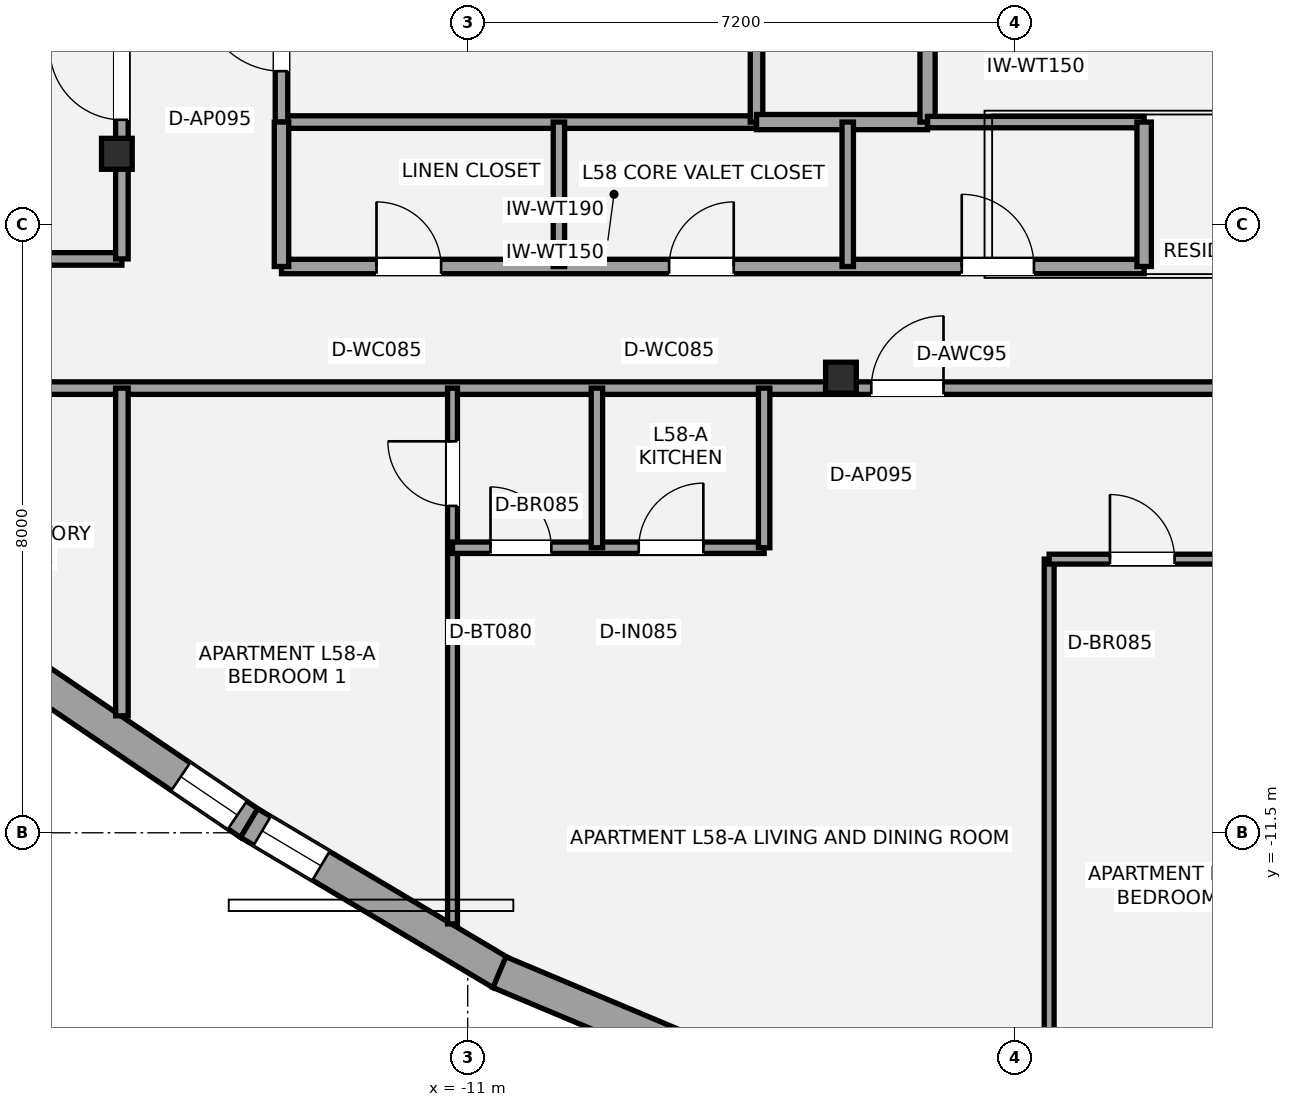
"""IFC4 building model, lengths in metres.
Left out: names, types, materials, properties, quantities, classifications, styles, units other than length and angle.
Written with IfcOpenShell. Run it as: python <this file> out.ifc"""

import sys

from ifc_helpers import new_model, si_unit, direction, frame, frame_2d, origin, origin_2d, place, context, subcontext, project, spatial, rectangle, i_section, extrude, element, fill, save


model = new_model("IFC4")
c1 = context("Model", 3, precision=1e-05, world=origin(), true_north=direction((0.0, 1.0)))
c2 = subcontext(c1, "Body", "Model", "MODEL_VIEW")
j1 = project(units=[si_unit("LENGTHUNIT", "METRE"), si_unit("PLANEANGLEUNIT", "RADIAN")], contexts=[c1])
p1 = place(None, origin())
s1 = spatial("IfcSite", under=j1, at=p1, CompositionType="ELEMENT")
p2 = place(p1, origin())
s2 = spatial("IfcBuilding", under=s1, at=p2, CompositionType="ELEMENT")
p3 = place(p2, frame((0.0, 0.0, 210.0)))
s3 = spatial("IfcBuildingStorey", under=s2, at=p3, CompositionType="ELEMENT", Elevation=210.0)
for number, where, z_axis, x_axis in (
    (1, (-15.616, -2.567, 0.0), (0.0, 0.0, 1.0), (1.0, 0.0, 0.0)),
    (2, (-6.09, -5.513, 0.0), (0.0, 0.0, 1.0), (1.0, 0.0, 0.0)),
):
    element("IfcColumn", number, at=place(p3, frame(where, z_axis=z_axis, x_axis=x_axis)), inside=s3, PredefinedType="COLUMN", context=c2, shape_type="SweptSolid", body=[
        extrude(i_section(OverallWidth=0.404, OverallDepth=0.407, WebThickness=0.027, FlangeThickness=0.044, at=origin_2d()), origin(), (0.0, 0.0, 1.0), 3.15),
    ])
p4 = place(p3, frame((-13.865, -11.379, 0.0), z_axis=(0.0, 0.0, 1.0), x_axis=(-0.827589832786, 0.561333295529, 0.0)))
e3 = element("IfcWall", 3, at=p4, inside=s3, PredefinedType="STANDARD", context=c2, shape_type="SweptSolid", body=[
    extrude(rectangle(XDim=3.693, YDim=0.44, at=frame_2d((1.847, 0.0))), origin(), (0.0, 0.0, 1.0), 2.336),
])
p5 = place(p4, frame((0.2, 0.0, 0.42)))
e4 = element("IfcOpeningElement", 4, at=p5, cuts=e3, PredefinedType="OPENING", context=c2, shape_type="SweptSolid", body=[
    extrude(rectangle(XDim=0.9, YDim=1.35, at=frame_2d((0.45, 0.675))), frame((0.0, 0.23, 0.0), z_axis=(0.0, -1.0, 0.0), x_axis=(1.0, 0.0, 0.0)), (0.0, 0.0, 1.0), 0.46),
])
p6 = place(p3, frame((-10.555, -13.348, 0.0), z_axis=(0.0, 0.0, 1.0), x_axis=(-0.859415840392, 0.511277237204, 0.0)))
e5 = element("IfcWall", 5, at=p6, inside=s3, PredefinedType="STANDARD", context=c2, shape_type="SweptSolid", body=[
    extrude(rectangle(XDim=3.864, YDim=0.44, at=frame_2d((1.932, 0.0))), origin(), (0.0, 0.0, 1.0), 2.336),
])
p7 = place(p6, frame((2.764, 0.0, 0.58)))
e6 = element("IfcOpeningElement", 6, at=p7, cuts=e5, PredefinedType="OPENING", context=c2, shape_type="SweptSolid", body=[
    extrude(rectangle(XDim=0.9, YDim=1.35, at=frame_2d((0.45, 0.675))), frame((0.0, 0.23, 0.0), z_axis=(0.0, -1.0, 0.0), x_axis=(1.0, 0.0, 0.0)), (0.0, 0.0, 1.0), 0.46),
])
p8 = place(p3, frame((-6.699, -14.966, 0.0), z_axis=(0.0, 0.0, 1.0), x_axis=(-0.921948168537, 0.387313276988, 0.0)))
e7 = element("IfcWall", 7, at=p8, inside=s3, PredefinedType="STANDARD", context=c2, shape_type="SweptSolid", body=[
    extrude(rectangle(XDim=4.213, YDim=0.44, at=frame_2d((2.106, 0.0))), origin(), (0.0, 0.0, 1.0), 2.336),
])
p9 = place(p8, frame((0.348, 0.0, 0.58)))
e8 = element("IfcOpeningElement", 8, at=p9, cuts=e7, PredefinedType="OPENING", context=c2, shape_type="SweptSolid", body=[
    extrude(rectangle(XDim=0.9, YDim=1.35, at=frame_2d((0.45, 0.675))), frame((0.0, 0.23, 0.0), z_axis=(0.0, -1.0, 0.0), x_axis=(1.0, 0.0, 0.0)), (0.0, 0.0, 1.0), 0.46),
])
p10 = place(p3, frame((-13.45, -2.15, 0.0), z_axis=(0.0, 0.0, 1.0), x_axis=(1.0, 0.0, 0.0)))
e9 = element("IfcWall", 9, at=p10, inside=s3, PredefinedType="PARTITIONING", context=c2, shape_type="SweptSolid", body=[
    extrude(rectangle(XDim=6.25, YDim=0.165, at=frame_2d((3.125, 0.0))), origin(), (0.0, 0.0, 1.0), 2.423),
])
p11 = place(p3, frame((-13.45, -2.15, 0.0), z_axis=(0.0, 0.0, 1.0), x_axis=(0.0, 1.0, 0.0)))
e10 = element("IfcWall", 10, at=p11, inside=s3, PredefinedType="PARTITIONING", context=c2, shape_type="SweptSolid", body=[
    extrude(rectangle(XDim=3.5, YDim=0.165, at=frame_2d((1.75, 0.0))), origin(), (0.0, 0.0, 1.0), 2.423),
])
p12 = place(p11, frame((0.67, 0.0, 0.0)))
e11 = element("IfcOpeningElement", 11, at=p12, cuts=e10, PredefinedType="OPENING", context=c2, shape_type="SweptSolid", body=[
    extrude(rectangle(XDim=1.05, YDim=2.15, at=frame_2d((0.525, 1.075))), frame((0.0, 0.093, 0.0), z_axis=(0.0, -1.0, 0.0), x_axis=(1.0, 0.0, 0.0)), (0.0, 0.0, 1.0), 0.185),
])
p13 = place(p3, frame((-7.2, -2.15, 0.0), z_axis=(0.0, 0.0, 1.0), x_axis=(0.0, 1.0, 0.0)))
e12 = element("IfcWall", 12, at=p13, inside=s3, PredefinedType="PARTITIONING", context=c2, shape_type="SweptSolid", body=[
    extrude(rectangle(XDim=3.5, YDim=0.165, at=frame_2d((1.75, 0.0))), origin(), (0.0, 0.0, 1.0), 2.423),
])
p14 = place(p3, frame((-7.2, -2.15, 0.0), z_axis=(0.0, 0.0, 1.0), x_axis=(1.0, 0.0, 0.0)))
e13 = element("IfcWall", 13, at=p14, inside=s3, PredefinedType="SOLIDWALL", context=c2, shape_type="SweptSolid", body=[
    extrude(rectangle(XDim=2.25, YDim=0.2, at=frame_2d((1.125, 0.0))), origin(), (0.0, 0.0, 1.0), 2.423),
])
p15 = place(p3, frame((-4.95, -2.15, 0.0), z_axis=(0.0, 0.0, 1.0), x_axis=(0.0, 1.0, 0.0)))
e14 = element("IfcWall", 14, at=p15, inside=s3, PredefinedType="SOLIDWALL", context=c2, shape_type="SweptSolid", body=[
    extrude(rectangle(XDim=3.5, YDim=0.2, at=frame_2d((1.75, 0.0))), origin(), (0.0, 0.0, 1.0), 2.423),
])
p16 = place(p15, frame((0.95, 0.0, 0.0)))
e15 = element("IfcOpeningElement", 15, at=p16, cuts=e14, PredefinedType="OPENING", context=c2, shape_type="SweptSolid", body=[
    extrude(rectangle(XDim=0.75, YDim=2.1, at=frame_2d((0.375, 1.05))), frame((0.0, 0.11, 0.0), z_axis=(0.0, -1.0, 0.0), x_axis=(1.0, 0.0, 0.0)), (0.0, 0.0, 1.0), 0.22),
])
p17 = place(p3, frame((-13.45, -4.05, 0.0), z_axis=(0.0, 0.0, 1.0), x_axis=(1.0, 0.0, 0.0)))
e16 = element("IfcWall", 16, at=p17, inside=s3, PredefinedType="PLUMBINGWALL", context=c2, shape_type="SweptSolid", body=[
    extrude(rectangle(XDim=11.35, YDim=0.19, at=frame_2d((5.675, 0.0))), origin(), (0.0, 0.0, 1.0), 2.357),
])
p18 = place(p17, frame((1.25, 0.0, 0.0)))
e17 = element("IfcOpeningElement", 17, at=p18, cuts=e16, PredefinedType="OPENING", context=c2, shape_type="SweptSolid", body=[
    extrude(rectangle(XDim=0.85, YDim=2.1, at=frame_2d((0.425, 1.05))), frame((0.0, 0.105, 0.0), z_axis=(0.0, -1.0, 0.0), x_axis=(1.0, 0.0, 0.0)), (0.0, 0.0, 1.0), 0.21),
])
p19 = place(p17, frame((5.1, 0.0, 0.0)))
e18 = element("IfcOpeningElement", 18, at=p19, cuts=e16, PredefinedType="OPENING", context=c2, shape_type="SweptSolid", body=[
    extrude(rectangle(XDim=0.85, YDim=2.1, at=frame_2d((0.425, 1.05))), frame((0.0, 0.105, 0.0), z_axis=(0.0, -1.0, 0.0), x_axis=(1.0, 0.0, 0.0)), (0.0, 0.0, 1.0), 0.21),
])
p20 = place(p17, frame((8.95, 0.0, 0.0)))
e19 = element("IfcOpeningElement", 19, at=p20, cuts=e16, PredefinedType="OPENING", context=c2, shape_type="SweptSolid", body=[
    extrude(rectangle(XDim=0.95, YDim=2.15, at=frame_2d((0.475, 1.075))), frame((0.0, 0.105, 0.0), z_axis=(0.0, -1.0, 0.0), x_axis=(1.0, 0.0, 0.0)), (0.0, 0.0, 1.0), 0.21),
])
p21 = place(p3, frame((-4.95, -2.15, 0.0), z_axis=(0.0, 0.0, 1.0), x_axis=(1.0, 0.0, 0.0)))
e20 = element("IfcWall", 20, at=p21, inside=s3, PredefinedType="PLUMBINGWALL", context=c2, shape_type="SweptSolid", body=[
    extrude(rectangle(XDim=2.85, YDim=0.15, at=frame_2d((1.425, 0.0))), origin(), (0.0, 0.0, 1.0), 2.97),
])
for number, where, z_axis, x_axis in (
    (21, (-13.45, -4.05, 0.0), (0.0, 0.0, 1.0), (0.0, 1.0, 0.0)),
    (22, (-2.1, -4.05, 0.0), (0.0, 0.0, 1.0), (0.0, 1.0, 0.0)),
):
    element("IfcWall", number, at=place(p3, frame(where, z_axis=z_axis, x_axis=x_axis)), inside=s3, PredefinedType="PLUMBINGWALL", context=c2, shape_type="SweptSolid", body=[
        extrude(rectangle(XDim=1.9, YDim=0.19, at=frame_2d((0.95, 0.0))), origin(), (0.0, 0.0, 1.0), 2.423),
    ])
p22 = place(p3, frame((-9.8, -4.05, 0.0), z_axis=(0.0, 0.0, 1.0), x_axis=(0.0, 1.0, 0.0)))
e23 = element("IfcWall", 23, at=p22, inside=s3, PredefinedType="PLUMBINGWALL", context=c2, shape_type="SweptSolid", body=[
    extrude(rectangle(XDim=1.9, YDim=0.15, at=frame_2d((0.95, 0.0))), origin(), (0.0, 0.0, 1.0), 2.97),
])
p23 = place(p3, frame((-6.0, -4.05, 0.0), z_axis=(0.0, 0.0, 1.0), x_axis=(0.0, 1.0, 0.0)))
e24 = element("IfcWall", 24, at=p23, inside=s3, PredefinedType="PLUMBINGWALL", context=c2, shape_type="SweptSolid", body=[
    extrude(rectangle(XDim=1.9, YDim=0.15, at=frame_2d((0.95, 0.0))), origin(), (0.0, 0.0, 1.0), 2.423),
])
p24 = place(p3, frame((-20.799, -5.65, 0.0), z_axis=(0.0, 0.0, 1.0), x_axis=(1.0, 0.0, 0.0)))
e25 = element("IfcWall", 25, at=p24, inside=s3, PredefinedType="PARTITIONING", context=c2, shape_type="SweptSolid", body=[
    extrude(rectangle(XDim=41.598, YDim=0.165, at=frame_2d((20.799, 0.0))), origin(), (0.0, 0.0, 1.0), 2.357),
])
p25 = place(p24, frame((1.62, 0.0, 0.0)))
e26 = element("IfcOpeningElement", 26, at=p25, cuts=e25, PredefinedType="OPENING", context=c2, shape_type="SweptSolid", body=[
    extrude(rectangle(XDim=1.0, YDim=2.15, at=frame_2d((0.5, 1.075))), frame((0.0, 0.093, 0.0), z_axis=(0.0, -1.0, 0.0), x_axis=(1.0, 0.0, 0.0)), (0.0, 0.0, 1.0), 0.185),
])
p26 = place(p24, frame((38.978, 0.0, 0.0)))
e27 = element("IfcOpeningElement", 27, at=p26, cuts=e25, PredefinedType="OPENING", context=c2, shape_type="SweptSolid", body=[
    extrude(rectangle(XDim=1.0, YDim=2.15, at=frame_2d((0.5, 1.075))), frame((0.0, 0.093, 0.0), z_axis=(0.0, -1.0, 0.0), x_axis=(1.0, 0.0, 0.0)), (0.0, 0.0, 1.0), 0.185),
])
p27 = place(p24, frame((15.109, 0.0, 0.0)))
e28 = element("IfcOpeningElement", 28, at=p27, cuts=e25, PredefinedType="OPENING", context=c2, shape_type="SweptSolid", body=[
    extrude(rectangle(XDim=0.95, YDim=2.15, at=frame_2d((0.475, 1.075))), frame((0.0, 0.093, 0.0), z_axis=(0.0, -1.0, 0.0), x_axis=(1.0, 0.0, 0.0)), (0.0, 0.0, 1.0), 0.185),
])
p28 = place(p24, frame((28.699, 0.0, 0.0)))
e29 = element("IfcOpeningElement", 29, at=p28, cuts=e25, PredefinedType="OPENING", context=c2, shape_type="SweptSolid", body=[
    extrude(rectangle(XDim=0.95, YDim=2.15, at=frame_2d((0.475, 1.075))), frame((0.0, 0.093, 0.0), z_axis=(0.0, -1.0, 0.0), x_axis=(1.0, 0.0, 0.0)), (0.0, 0.0, 1.0), 0.185),
])
p29 = place(p3, frame((-22.183, -3.95, 0.0), z_axis=(0.0, 0.0, 1.0), x_axis=(1.0, 0.0, 0.0)))
e30 = element("IfcWall", 30, at=p29, inside=s3, PredefinedType="PARTITIONING", context=c2, shape_type="SweptSolid", body=[
    extrude(rectangle(XDim=6.633, YDim=0.165, at=frame_2d((3.316, 0.0))), origin(), (0.0, 0.0, 1.0), 2.423),
])
p30 = place(p3, frame((-15.55, -3.95, 0.0), z_axis=(0.0, 0.0, 1.0), x_axis=(0.0, 1.0, 0.0)))
e31 = element("IfcWall", 31, at=p30, inside=s3, PredefinedType="PARTITIONING", context=c2, shape_type="SweptSolid", body=[
    extrude(rectangle(XDim=3.6, YDim=0.165, at=frame_2d((1.8, 0.0))), origin(), (0.0, 0.0, 1.0), 2.357),
])
p31 = place(p30, frame((1.83, 0.0, 0.0)))
e32 = element("IfcOpeningElement", 32, at=p31, cuts=e31, PredefinedType="OPENING", context=c2, shape_type="SweptSolid", body=[
    extrude(rectangle(XDim=0.95, YDim=2.15, at=frame_2d((0.475, 1.075))), frame((0.0, 0.093, 0.0), z_axis=(0.0, -1.0, 0.0), x_axis=(1.0, 0.0, 0.0)), (0.0, 0.0, 1.0), 0.185),
])
p32 = place(p3, frame((-15.55, -9.961, 0.0), z_axis=(0.0, 0.0, 1.0), x_axis=(0.0, 1.0, 0.0)))
e33 = element("IfcWall", 33, at=p32, inside=s3, PredefinedType="PARTITIONING", context=c2, shape_type="SweptSolid", body=[
    extrude(rectangle(XDim=4.311, YDim=0.165, at=frame_2d((2.156, 0.0))), origin(), (0.0, 0.0, 1.0), 2.423),
])
p33 = place(p3, frame((-11.2, -12.699, 0.0), z_axis=(0.0, 0.0, 1.0), x_axis=(0.0, 1.0, 0.0)))
e34 = element("IfcWall", 34, at=p33, inside=s3, PredefinedType="PARTITIONING", context=c2, shape_type="SweptSolid", body=[
    extrude(rectangle(XDim=7.049, YDim=0.13, at=frame_2d((3.524, 0.0))), origin(), (0.0, 0.0, 1.0), 2.423),
])
p34 = place(p33, frame((5.499, 0.0, 0.0)))
e35 = element("IfcOpeningElement", 35, at=p34, cuts=e34, PredefinedType="OPENING", context=c2, shape_type="SweptSolid", body=[
    extrude(rectangle(XDim=0.85, YDim=2.1, at=frame_2d((0.425, 1.05))), frame((0.0, 0.075, 0.0), z_axis=(0.0, -1.0, 0.0), x_axis=(1.0, 0.0, 0.0)), (0.0, 0.0, 1.0), 0.15),
])
p35 = place(p3, frame((-11.2, -7.75, 0.0), z_axis=(0.0, 0.0, 1.0), x_axis=(1.0, 0.0, 0.0)))
e36 = element("IfcWall", 36, at=p35, inside=s3, PredefinedType="PLUMBINGWALL", context=c2, shape_type="SweptSolid", body=[
    extrude(rectangle(XDim=4.1, YDim=0.15, at=frame_2d((2.05, 0.0))), origin(), (0.0, 0.0, 1.0), 2.423),
])
p36 = place(p35, frame((0.5, 0.0, 0.0)))
e37 = element("IfcOpeningElement", 37, at=p36, cuts=e36, PredefinedType="OPENING", context=c2, shape_type="SweptSolid", body=[
    extrude(rectangle(XDim=0.8, YDim=2.1, at=frame_2d((0.4, 1.05))), frame((0.0, 0.085, 0.0), z_axis=(0.0, -1.0, 0.0), x_axis=(1.0, 0.0, 0.0)), (0.0, 0.0, 1.0), 0.17),
])
p37 = place(p35, frame((2.45, 0.0, 0.0)))
e38 = element("IfcOpeningElement", 38, at=p37, cuts=e36, PredefinedType="OPENING", context=c2, shape_type="SweptSolid", body=[
    extrude(rectangle(XDim=0.85, YDim=2.1, at=frame_2d((0.425, 1.05))), frame((0.0, 0.085, 0.0), z_axis=(0.0, -1.0, 0.0), x_axis=(1.0, 0.0, 0.0)), (0.0, 0.0, 1.0), 0.17),
])
p38 = place(p3, frame((-9.3, -7.75, 0.0), z_axis=(0.0, 0.0, 1.0), x_axis=(0.0, 1.0, 0.0)))
e39 = element("IfcWall", 39, at=p38, inside=s3, PredefinedType="PLUMBINGWALL", context=c2, shape_type="SweptSolid", body=[
    extrude(rectangle(XDim=2.1, YDim=0.15, at=frame_2d((1.05, 0.0))), origin(), (0.0, 0.0, 1.0), 2.97),
])
p39 = place(p3, frame((-7.1, -7.75, 0.0), z_axis=(0.0, 0.0, 1.0), x_axis=(0.0, 1.0, 0.0)))
e40 = element("IfcWall", 40, at=p39, inside=s3, PredefinedType="PLUMBINGWALL", context=c2, shape_type="SweptSolid", body=[
    extrude(rectangle(XDim=2.1, YDim=0.15, at=frame_2d((1.05, 0.0))), origin(), (0.0, 0.0, 1.0), 2.423),
])
p40 = place(p3, frame((-3.35, -15.481, 0.0), z_axis=(0.0, 0.0, 1.0), x_axis=(0.0, 1.0, 0.0)))
e41 = element("IfcWall", 41, at=p40, inside=s3, PredefinedType="PARTITIONING", context=c2, shape_type="SweptSolid", body=[
    extrude(rectangle(XDim=7.581, YDim=0.13, at=frame_2d((3.791, 0.0))), origin(), (0.0, 0.0, 1.0), 2.423),
])
p41 = place(p3, frame((-3.35, -7.9, 0.0), z_axis=(0.0, 0.0, 1.0), x_axis=(1.0, 0.0, 0.0)))
e42 = element("IfcWall", 42, at=p41, inside=s3, PredefinedType="PARTITIONING", context=c2, shape_type="SweptSolid", body=[
    extrude(rectangle(XDim=3.35, YDim=0.13, at=frame_2d((1.675, 0.0))), origin(), (0.0, 0.0, 1.0), 2.423),
])
p42 = place(p41, frame((0.8, 0.0, 0.0)))
e43 = element("IfcOpeningElement", 43, at=p42, cuts=e42, PredefinedType="OPENING", context=c2, shape_type="SweptSolid", body=[
    extrude(rectangle(XDim=0.85, YDim=2.1, at=frame_2d((0.425, 1.05))), frame((0.0, 0.075, 0.0), z_axis=(0.0, -1.0, 0.0), x_axis=(1.0, 0.0, 0.0)), (0.0, 0.0, 1.0), 0.15),
])
p43 = place(p5, origin())
e44 = element("IfcWindow", 44, at=p43, inside=s3, PartitioningType="SINGLE_PANEL", PredefinedType="WINDOW", context=c2, shape_type="SweptSolid", body=[
    extrude(rectangle(XDim=0.9, YDim=1.35, at=frame_2d((0.45, 0.675))), frame((0.0, -0.01, 0.0), z_axis=(0.0, -1.0, 0.0), x_axis=(1.0, 0.0, 0.0)), (0.0, 0.0, 1.0), 0.06),
])
fill(e4, e44)
p44 = place(p7, origin())
e45 = element("IfcWindow", 45, at=p44, inside=s3, PartitioningType="SINGLE_PANEL", PredefinedType="WINDOW", context=c2, shape_type="SweptSolid", body=[
    extrude(rectangle(XDim=0.9, YDim=1.35, at=frame_2d((0.45, 0.675))), frame((0.0, -0.01, 0.0), z_axis=(0.0, -1.0, 0.0), x_axis=(1.0, 0.0, 0.0)), (0.0, 0.0, 1.0), 0.06),
])
fill(e6, e45)
p45 = place(p12, origin())
e46 = element("IfcDoor", 46, at=p45, inside=s3, OperationType="SINGLE_SWING_RIGHT", PredefinedType="DOOR", context=c2, shape_type="SweptSolid", body=[
    extrude(rectangle(XDim=1.05, YDim=2.15, at=frame_2d((0.525, 1.075))), frame((0.0, 0.025, 0.0), z_axis=(0.0, -1.0, 0.0), x_axis=(1.0, 0.0, 0.0)), (0.0, 0.0, 1.0), 0.05),
])
fill(e11, e46)
p46 = place(p18, origin())
e47 = element("IfcDoor", 47, at=p46, inside=s3, OperationType="SINGLE_SWING_LEFT", PredefinedType="DOOR", context=c2, shape_type="SweptSolid", body=[
    extrude(rectangle(XDim=0.85, YDim=2.1, at=frame_2d((0.425, 1.05))), frame((0.0, 0.025, 0.0), z_axis=(0.0, -1.0, 0.0), x_axis=(1.0, 0.0, 0.0)), (0.0, 0.0, 1.0), 0.05),
])
fill(e17, e47)
p47 = place(p19, origin())
e48 = element("IfcDoor", 48, at=p47, inside=s3, OperationType="SINGLE_SWING_RIGHT", PredefinedType="DOOR", context=c2, shape_type="SweptSolid", body=[
    extrude(rectangle(XDim=0.85, YDim=2.1, at=frame_2d((0.425, 1.05))), frame((0.0, 0.025, 0.0), z_axis=(0.0, -1.0, 0.0), x_axis=(1.0, 0.0, 0.0)), (0.0, 0.0, 1.0), 0.05),
])
fill(e18, e48)
p48 = place(p20, origin())
e49 = element("IfcDoor", 49, at=p48, inside=s3, OperationType="SINGLE_SWING_LEFT", PredefinedType="DOOR", context=c2, shape_type="SweptSolid", body=[
    extrude(rectangle(XDim=0.95, YDim=2.15, at=frame_2d((0.475, 1.075))), frame((0.0, 0.025, 0.0), z_axis=(0.0, -1.0, 0.0), x_axis=(1.0, 0.0, 0.0)), (0.0, 0.0, 1.0), 0.05),
])
fill(e19, e49)
p49 = place(p34, origin())
e50 = element("IfcDoor", 50, at=p49, inside=s3, OperationType="SINGLE_SWING_RIGHT", PredefinedType="DOOR", context=c2, shape_type="SweptSolid", body=[
    extrude(rectangle(XDim=0.85, YDim=2.1, at=frame_2d((0.425, 1.05))), frame((0.0, 0.025, 0.0), z_axis=(0.0, -1.0, 0.0), x_axis=(1.0, 0.0, 0.0)), (0.0, 0.0, 1.0), 0.05),
])
fill(e35, e50)
p50 = place(p36, origin())
e51 = element("IfcDoor", 51, at=p50, inside=s3, OperationType="SINGLE_SWING_LEFT", PredefinedType="DOOR", context=c2, shape_type="SweptSolid", body=[
    extrude(rectangle(XDim=0.8, YDim=2.1, at=frame_2d((0.4, 1.05))), frame((0.0, 0.025, 0.0), z_axis=(0.0, -1.0, 0.0), x_axis=(1.0, 0.0, 0.0)), (0.0, 0.0, 1.0), 0.05),
])
fill(e37, e51)
p51 = place(p37, origin())
e52 = element("IfcDoor", 52, at=p51, inside=s3, OperationType="SINGLE_SWING_RIGHT", PredefinedType="DOOR", context=c2, shape_type="SweptSolid", body=[
    extrude(rectangle(XDim=0.85, YDim=2.1, at=frame_2d((0.425, 1.05))), frame((0.0, 0.025, 0.0), z_axis=(0.0, -1.0, 0.0), x_axis=(1.0, 0.0, 0.0)), (0.0, 0.0, 1.0), 0.05),
])
fill(e38, e52)
p52 = place(p27, origin())
e53 = element("IfcDoor", 53, at=p52, inside=s3, OperationType="SINGLE_SWING_RIGHT", PredefinedType="DOOR", context=c2, shape_type="SweptSolid", body=[
    extrude(rectangle(XDim=0.95, YDim=2.15, at=frame_2d((0.475, 1.075))), frame((0.0, 0.025, 0.0), z_axis=(0.0, -1.0, 0.0), x_axis=(1.0, 0.0, 0.0)), (0.0, 0.0, 1.0), 0.05),
])
fill(e28, e53)
p53 = place(p42, origin())
e54 = element("IfcDoor", 54, at=p53, inside=s3, OperationType="SINGLE_SWING_LEFT", PredefinedType="DOOR", context=c2, shape_type="SweptSolid", body=[
    extrude(rectangle(XDim=0.85, YDim=2.1, at=frame_2d((0.425, 1.05))), frame((0.0, 0.025, 0.0), z_axis=(0.0, -1.0, 0.0), x_axis=(1.0, 0.0, 0.0)), (0.0, 0.0, 1.0), 0.05),
])
fill(e43, e54)
p54 = place(p31, origin())
e55 = element("IfcDoor", 55, at=p54, inside=s3, OperationType="SINGLE_SWING_RIGHT", PredefinedType="DOOR", context=c2, shape_type="SweptSolid", body=[
    extrude(rectangle(XDim=0.95, YDim=2.15, at=frame_2d((0.475, 1.075))), frame((0.0, 0.025, 0.0), z_axis=(0.0, -1.0, 0.0), x_axis=(1.0, 0.0, 0.0)), (0.0, 0.0, 1.0), 0.05),
])
fill(e32, e55)
save(model, sys.argv[1])
